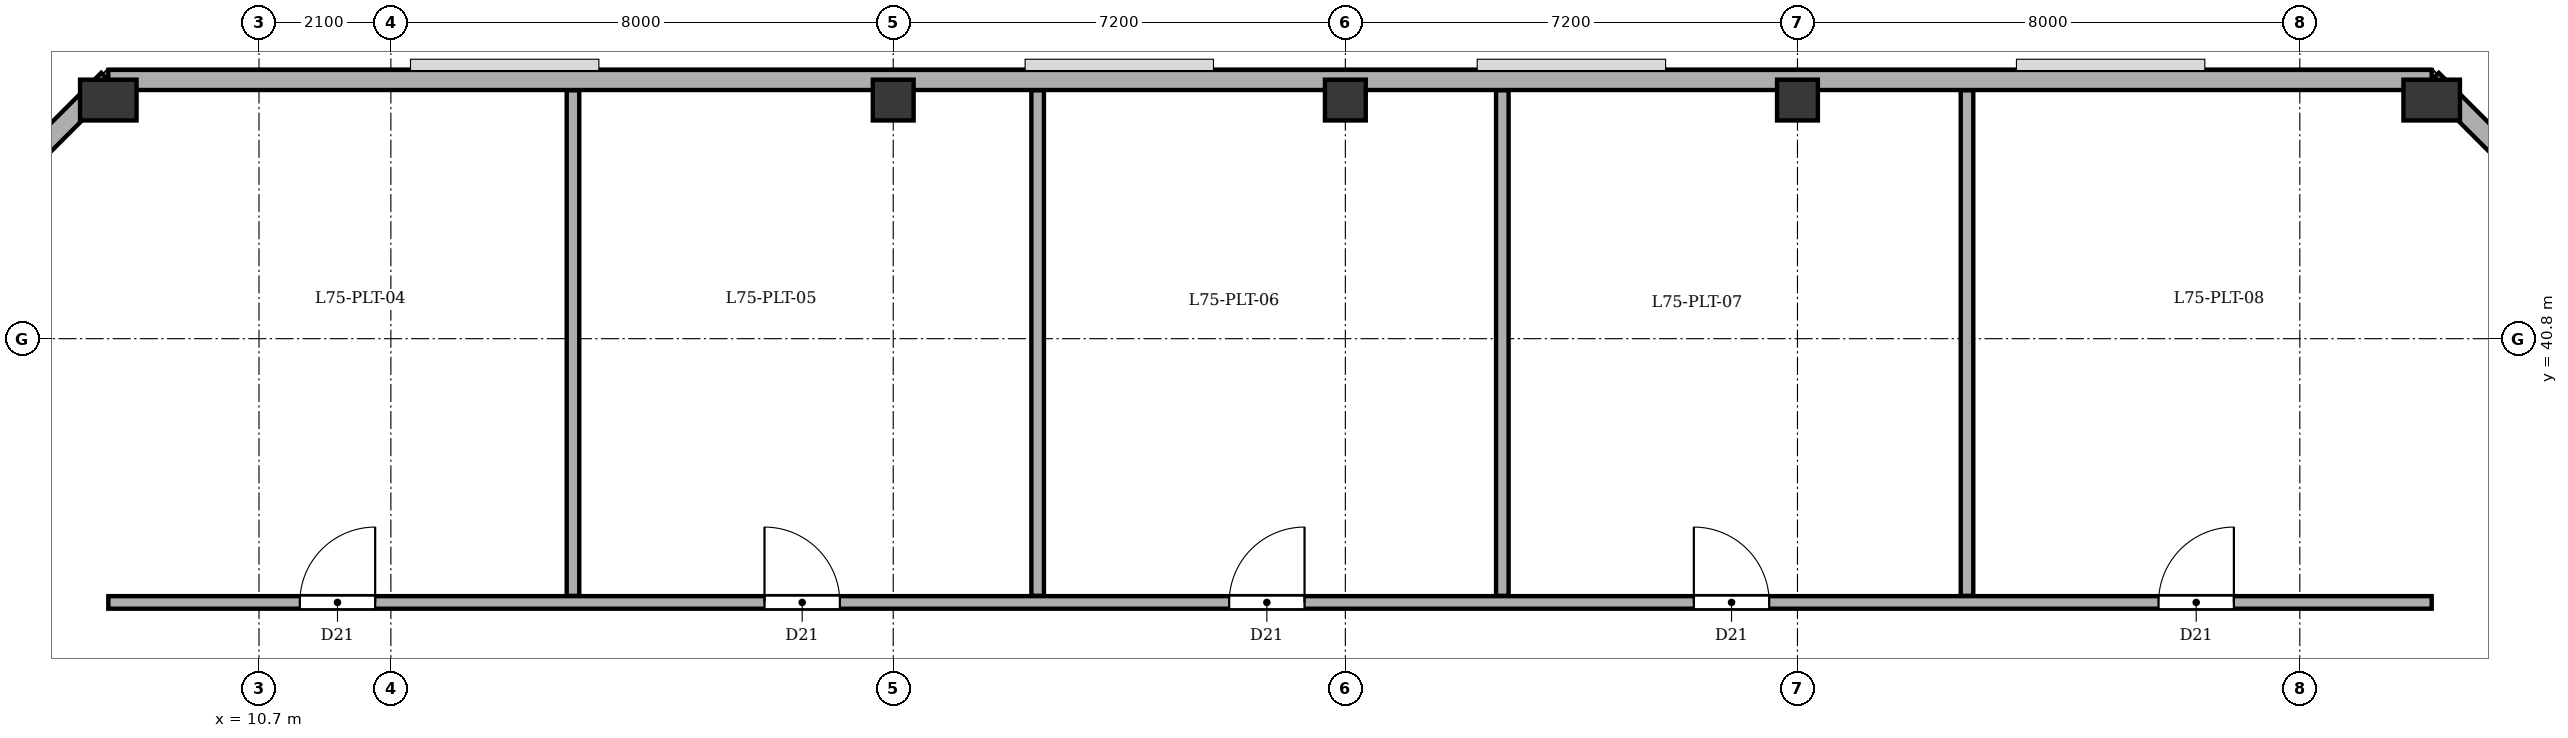
"""IFC4 building model, lengths in metres.
Left out: names, types, materials, properties, quantities, classifications, styles, units other than length and angle.
Written with IfcOpenShell. Run it as: python <this file> out.ifc"""

import sys

from ifc_helpers import new_model, si_unit, direction, frame, frame_2d, origin, origin_2d, place, context, subcontext, project, spatial, rectangle, extrude, element, fill, save


model = new_model("IFC4")
c1 = context("Model", 3, precision=1e-05, world=origin(), true_north=direction((0.0, 1.0)))
c2 = subcontext(c1, "Body", "Model", "MODEL_VIEW")
j1 = project(units=[si_unit("LENGTHUNIT", "METRE"), si_unit("PLANEANGLEUNIT", "RADIAN")], contexts=[c1])
p1 = place(None, origin())
s1 = spatial("IfcSite", under=j1, at=p1, CompositionType="ELEMENT")
p2 = place(p1, origin())
s2 = spatial("IfcBuilding", under=s1, at=p2, CompositionType="ELEMENT")
p3 = place(p2, frame((0.0, 0.0, 282.3)))
s3 = spatial("IfcBuildingStorey", under=s2, at=p3, CompositionType="ELEMENT", Elevation=282.3)
p4 = place(p3, frame((8.3, 44.6, 0.0), z_axis=(0.0, 0.0, 1.0), x_axis=(1.0, 0.0, 0.0)))
e1 = element("IfcColumn", 1, at=p4, inside=s3, PredefinedType="COLUMN", context=c2, shape_type="SweptSolid", body=[
    extrude(rectangle(XDim=0.65, YDim=0.9, at=origin_2d()), origin(), (0.0, 0.0, 1.0), 5.1),
])
for number, where, z_axis, x_axis in (
    (2, (20.8, 44.6, 0.0), (0.0, 0.0, 1.0), (1.0, 0.0, 0.0)),
    (3, (28.0, 44.6, 0.0), (0.0, 0.0, 1.0), (1.0, 0.0, 0.0)),
    (4, (35.2, 44.6, 0.0), (0.0, 0.0, 1.0), (1.0, 0.0, 0.0)),
):
    element("IfcColumn", number, at=place(p3, frame(where, z_axis=z_axis, x_axis=x_axis)), inside=s3, PredefinedType="COLUMN", context=c2, shape_type="SweptSolid", body=[
        extrude(rectangle(XDim=0.65, YDim=0.65, at=origin_2d()), origin(), (0.0, 0.0, 1.0), 5.1),
    ])
p5 = place(p3, frame((45.3, 44.6, 0.0), z_axis=(0.0, 0.0, 1.0), x_axis=(1.0, 0.0, 0.0)))
e5 = element("IfcColumn", 5, at=p5, inside=s3, PredefinedType="COLUMN", context=c2, shape_type="SweptSolid", body=[
    extrude(rectangle(XDim=0.65, YDim=0.9, at=origin_2d()), origin(), (0.0, 0.0, 1.0), 5.1),
])
p6 = place(p3, frame((4.48, 41.1, 0.0), z_axis=(0.0, 0.0, 1.0), x_axis=(0.70712937715, 0.707084184501, 0.0)))
e6 = element("IfcWall", 6, at=p6, inside=s3, PredefinedType="STANDARD", context=c2, shape_type="SweptSolid", body=[
    extrude(rectangle(XDim=5.402, YDim=0.32, at=frame_2d((2.701, 0.0))), origin(), (0.0, 0.0, 1.0), 4.035),
])
p7 = place(p3, frame((8.3, 44.92, 0.0), z_axis=(0.0, 0.0, 1.0), x_axis=(1.0, 0.0, 0.0)))
e7 = element("IfcWall", 7, at=p7, inside=s3, PredefinedType="STANDARD", context=c2, shape_type="SweptSolid", body=[
    extrude(rectangle(XDim=37.0, YDim=0.32, at=frame_2d((18.5, 0.0))), origin(), (0.0, 0.0, 1.0), 4.035),
])
p8 = place(p3, frame((45.3, 44.92, 0.0), z_axis=(0.0, 0.0, 1.0), x_axis=(0.70712937715, -0.707084184501, 0.0)))
e8 = element("IfcWall", 8, at=p8, inside=s3, PredefinedType="STANDARD", context=c2, shape_type="SweptSolid", body=[
    extrude(rectangle(XDim=5.402, YDim=0.32, at=frame_2d((2.701, 0.0))), origin(), (0.0, 0.0, 1.0), 4.035),
])
p9 = place(p3, frame((8.3, 36.6, 0.0), z_axis=(0.0, 0.0, 1.0), x_axis=(1.0, 0.0, 0.0)))
e9 = element("IfcWall", 9, at=p9, inside=s3, PredefinedType="SOLIDWALL", context=c2, shape_type="SweptSolid", body=[
    extrude(rectangle(XDim=37.0, YDim=0.2, at=frame_2d((18.5, 0.0))), origin(), (0.0, 0.0, 1.0), 4.65),
])
p10 = place(p9, frame((3.05, 0.0, 0.0)))
e10 = element("IfcOpeningElement", 10, at=p10, cuts=e9, PredefinedType="OPENING", context=c2, shape_type="SweptSolid", body=[
    extrude(rectangle(XDim=1.2, YDim=2.15, at=frame_2d((0.6, 1.075))), frame((0.0, 0.11, 0.0), z_axis=(0.0, -1.0, 0.0), x_axis=(1.0, 0.0, 0.0)), (0.0, 0.0, 1.0), 0.22),
])
p11 = place(p9, frame((10.45, 0.0, 0.0)))
e11 = element("IfcOpeningElement", 11, at=p11, cuts=e9, PredefinedType="OPENING", context=c2, shape_type="SweptSolid", body=[
    extrude(rectangle(XDim=1.2, YDim=2.15, at=frame_2d((0.6, 1.075))), frame((0.0, 0.11, 0.0), z_axis=(0.0, -1.0, 0.0), x_axis=(1.0, 0.0, 0.0)), (0.0, 0.0, 1.0), 0.22),
])
p12 = place(p9, frame((17.85, 0.0, 0.0)))
e12 = element("IfcOpeningElement", 12, at=p12, cuts=e9, PredefinedType="OPENING", context=c2, shape_type="SweptSolid", body=[
    extrude(rectangle(XDim=1.2, YDim=2.15, at=frame_2d((0.6, 1.075))), frame((0.0, 0.11, 0.0), z_axis=(0.0, -1.0, 0.0), x_axis=(1.0, 0.0, 0.0)), (0.0, 0.0, 1.0), 0.22),
])
p13 = place(p9, frame((25.25, 0.0, 0.0)))
e13 = element("IfcOpeningElement", 13, at=p13, cuts=e9, PredefinedType="OPENING", context=c2, shape_type="SweptSolid", body=[
    extrude(rectangle(XDim=1.2, YDim=2.15, at=frame_2d((0.6, 1.075))), frame((0.0, 0.11, 0.0), z_axis=(0.0, -1.0, 0.0), x_axis=(1.0, 0.0, 0.0)), (0.0, 0.0, 1.0), 0.22),
])
p14 = place(p9, frame((32.65, 0.0, 0.0)))
e14 = element("IfcOpeningElement", 14, at=p14, cuts=e9, PredefinedType="OPENING", context=c2, shape_type="SweptSolid", body=[
    extrude(rectangle(XDim=1.2, YDim=2.15, at=frame_2d((0.6, 1.075))), frame((0.0, 0.11, 0.0), z_axis=(0.0, -1.0, 0.0), x_axis=(1.0, 0.0, 0.0)), (0.0, 0.0, 1.0), 0.22),
])
for number, where, z_axis, x_axis in (
    (15, (15.7, 36.705, 0.0), (0.0, 0.0, 1.0), (0.0, 1.0, 0.0)),
    (16, (23.1, 36.705, 0.0), (0.0, 0.0, 1.0), (0.0, 1.0, 0.0)),
    (17, (30.5, 36.705, 0.0), (0.0, 0.0, 1.0), (0.0, 1.0, 0.0)),
    (18, (37.9, 36.705, 0.0), (0.0, 0.0, 1.0), (0.0, 1.0, 0.0)),
):
    element("IfcWall", number, at=place(p3, frame(where, z_axis=z_axis, x_axis=x_axis)), inside=s3, PredefinedType="SOLIDWALL", context=c2, shape_type="SweptSolid", body=[
        extrude(rectangle(XDim=8.05, YDim=0.2, at=frame_2d((4.025, 0.0))), origin(), (0.0, 0.0, 1.0), 4.65),
    ])
p15 = place(p10, origin())
e19 = element("IfcDoor", 19, at=p15, inside=s3, OperationType="SINGLE_SWING_RIGHT", PredefinedType="DOOR", context=c2, shape_type="SweptSolid", body=[
    extrude(rectangle(XDim=1.2, YDim=2.15, at=frame_2d((0.6, 1.075))), frame((0.0, 0.025, 0.0), z_axis=(0.0, -1.0, 0.0), x_axis=(1.0, 0.0, 0.0)), (0.0, 0.0, 1.0), 0.05),
])
fill(e10, e19)
p16 = place(p11, origin())
e20 = element("IfcDoor", 20, at=p16, inside=s3, OperationType="SINGLE_SWING_LEFT", PredefinedType="DOOR", context=c2, shape_type="SweptSolid", body=[
    extrude(rectangle(XDim=1.2, YDim=2.15, at=frame_2d((0.6, 1.075))), frame((0.0, 0.025, 0.0), z_axis=(0.0, -1.0, 0.0), x_axis=(1.0, 0.0, 0.0)), (0.0, 0.0, 1.0), 0.05),
])
fill(e11, e20)
p17 = place(p12, origin())
e21 = element("IfcDoor", 21, at=p17, inside=s3, OperationType="SINGLE_SWING_RIGHT", PredefinedType="DOOR", context=c2, shape_type="SweptSolid", body=[
    extrude(rectangle(XDim=1.2, YDim=2.15, at=frame_2d((0.6, 1.075))), frame((0.0, 0.025, 0.0), z_axis=(0.0, -1.0, 0.0), x_axis=(1.0, 0.0, 0.0)), (0.0, 0.0, 1.0), 0.05),
])
fill(e12, e21)
p18 = place(p13, origin())
e22 = element("IfcDoor", 22, at=p18, inside=s3, OperationType="SINGLE_SWING_LEFT", PredefinedType="DOOR", context=c2, shape_type="SweptSolid", body=[
    extrude(rectangle(XDim=1.2, YDim=2.15, at=frame_2d((0.6, 1.075))), frame((0.0, 0.025, 0.0), z_axis=(0.0, -1.0, 0.0), x_axis=(1.0, 0.0, 0.0)), (0.0, 0.0, 1.0), 0.05),
])
fill(e13, e22)
p19 = place(p14, origin())
e23 = element("IfcDoor", 23, at=p19, inside=s3, OperationType="SINGLE_SWING_RIGHT", PredefinedType="DOOR", context=c2, shape_type="SweptSolid", body=[
    extrude(rectangle(XDim=1.2, YDim=2.15, at=frame_2d((0.6, 1.075))), frame((0.0, 0.025, 0.0), z_axis=(0.0, -1.0, 0.0), x_axis=(1.0, 0.0, 0.0)), (0.0, 0.0, 1.0), 0.05),
])
fill(e14, e23)
save(model, sys.argv[1])
